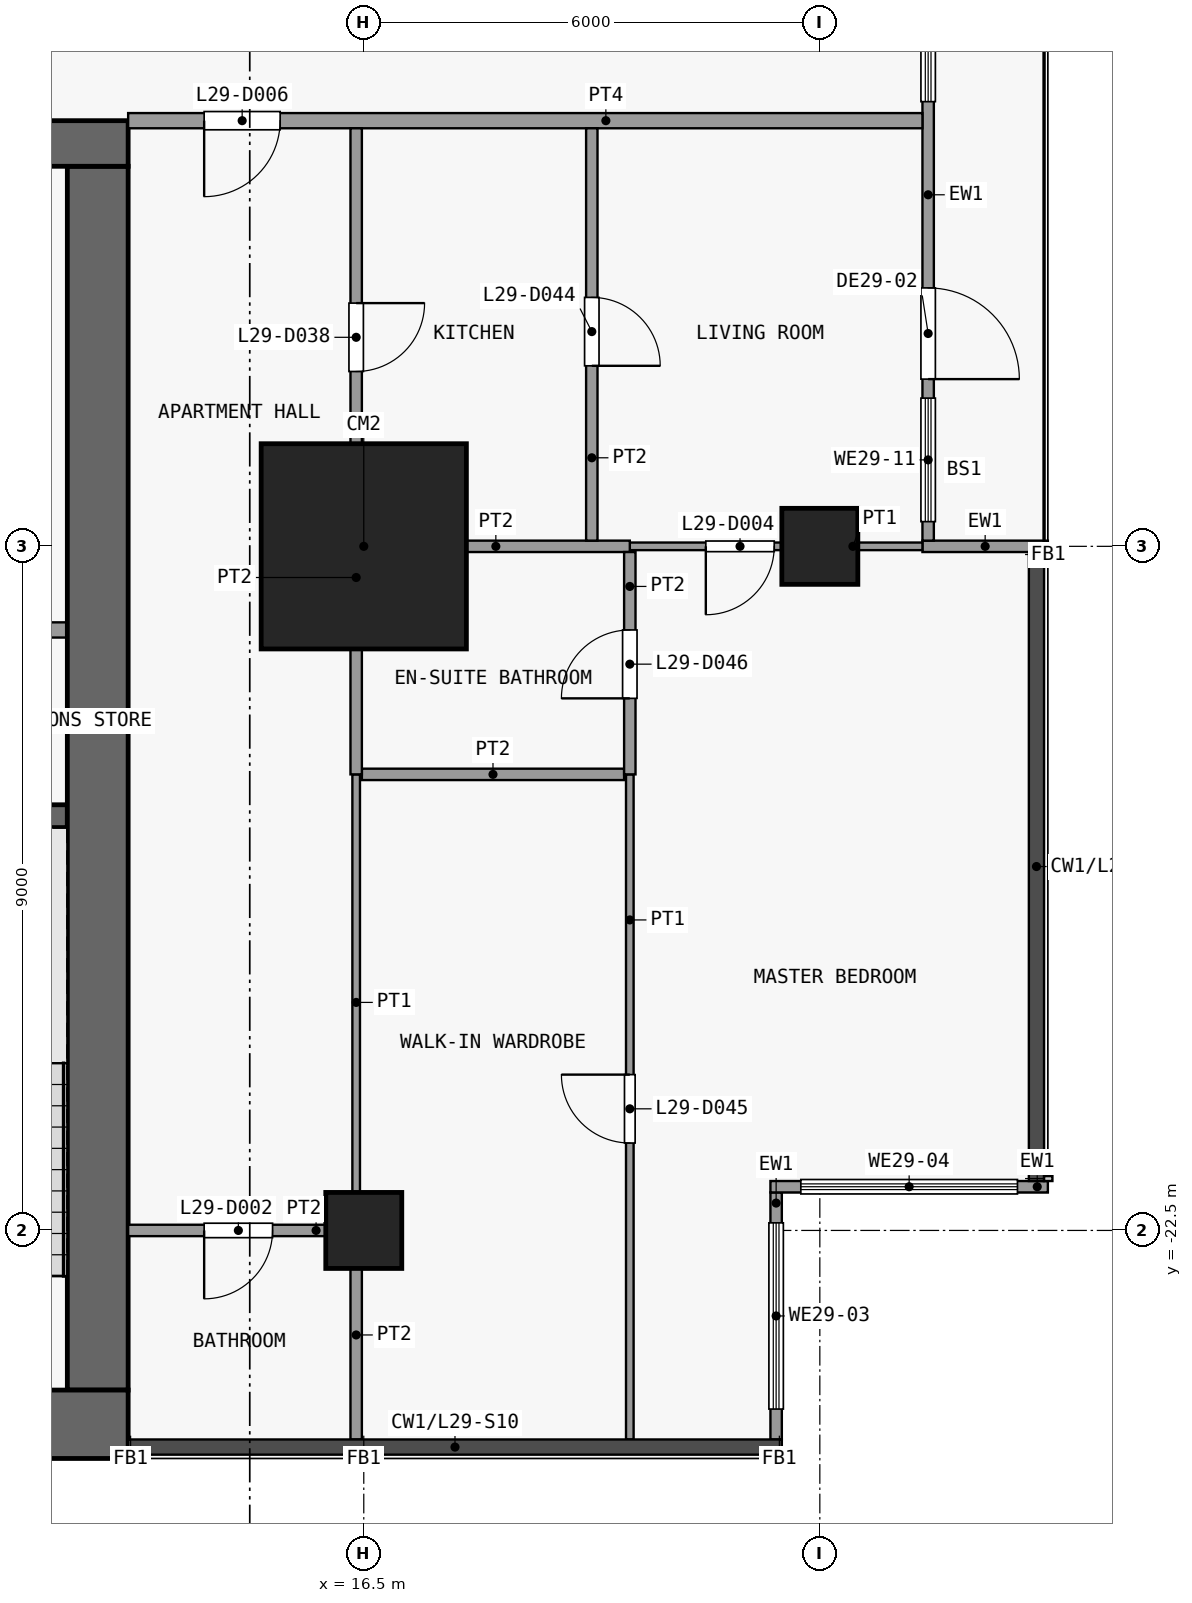
"""IFC4 building model, lengths in metres.
Left out: names, types, materials, properties, quantities, classifications, styles, units other than length and angle.
Written with IfcOpenShell. Run it as: python <this file> out.ifc"""

import sys

from ifc_helpers import new_model, si_unit, direction, frame, frame_2d, origin, origin_2d, place, context, subcontext, project, spatial, rectangle, extrude, element, fill, save


model = new_model("IFC4")
c1 = context("Model", 3, precision=1e-05, world=origin(), true_north=direction((0.0, 1.0)))
c2 = subcontext(c1, "Body", "Model", "MODEL_VIEW")
j1 = project(units=[si_unit("LENGTHUNIT", "METRE"), si_unit("PLANEANGLEUNIT", "RADIAN")], contexts=[c1])
p1 = place(None, origin())
s1 = spatial("IfcSite", under=j1, at=p1, CompositionType="ELEMENT")
p2 = place(p1, origin())
s2 = spatial("IfcBuilding", under=s1, at=p2, CompositionType="ELEMENT")
p3 = place(p2, frame((0.0, 0.0, 117.1)))
s3 = spatial("IfcBuildingStorey", under=s2, at=p3, CompositionType="ELEMENT", Elevation=117.1)
p4 = place(p3, frame((16.5, -22.5, 0.0), z_axis=(0.0, 0.0, 1.0), x_axis=(1.0, 0.0, 0.0)))
e1 = element("IfcColumn", 1, at=p4, inside=s3, PredefinedType="COLUMN", context=c2, shape_type="SweptSolid", body=[
    extrude(rectangle(XDim=1.0, YDim=1.0, at=origin_2d()), origin(), (0.0, 0.0, 1.0), 3.6),
])
p5 = place(p3, frame((16.5, -13.5, 0.0), z_axis=(0.0, 0.0, 1.0), x_axis=(1.0, 0.0, 0.0)))
e2 = element("IfcColumn", 2, at=p5, inside=s3, PredefinedType="COLUMN", context=c2, shape_type="SweptSolid", body=[
    extrude(rectangle(XDim=2.7, YDim=2.7, at=origin_2d()), origin(), (0.0, 0.0, 1.0), 3.6),
])
p6 = place(p3, frame((22.5, -13.5, 0.0), z_axis=(0.0, 0.0, 1.0), x_axis=(1.0, 0.0, 0.0)))
e3 = element("IfcColumn", 3, at=p6, inside=s3, PredefinedType="COLUMN", context=c2, shape_type="SweptSolid", body=[
    extrude(rectangle(XDim=1.0, YDim=1.0, at=origin_2d()), origin(), (0.0, 0.0, 1.0), 3.6),
])
p7 = place(p3, frame((-13.4, -25.05, 0.0), z_axis=(0.0, 0.0, 1.0), x_axis=(1.0, 0.0, 0.0)))
e4 = element("IfcWall", 4, at=p7, inside=s3, PredefinedType="SHEAR", context=c2, shape_type="SweptSolid", body=[
    extrude(rectangle(XDim=26.8, YDim=0.9, at=frame_2d((13.4, 0.0))), origin(), (0.0, 0.0, 1.0), 3.3),
])
p8 = place(p3, frame((-13.4, -8.2, 0.0), z_axis=(0.0, 0.0, 1.0), x_axis=(1.0, 0.0, 0.0)))
e5 = element("IfcWall", 5, at=p8, inside=s3, PredefinedType="SHEAR", context=c2, shape_type="SweptSolid", body=[
    extrude(rectangle(XDim=26.8, YDim=0.6, at=frame_2d((13.4, 0.0))), origin(), (0.0, 0.0, 1.0), 3.3),
])
p9 = place(p8, frame((7.7, 0.0, 0.0)))
e6 = element("IfcOpeningElement", 6, at=p9, cuts=e5, PredefinedType="OPENING", context=c2, shape_type="SweptSolid", body=[
    extrude(rectangle(XDim=1.8, YDim=2.1, at=frame_2d((0.9, 1.05))), frame((0.0, 0.31, 0.0), z_axis=(0.0, -1.0, 0.0), x_axis=(1.0, 0.0, 0.0)), (0.0, 0.0, 1.0), 0.62),
])
p10 = place(p8, frame((17.3, 0.0, 0.0)))
e7 = element("IfcOpeningElement", 7, at=p10, cuts=e5, PredefinedType="OPENING", context=c2, shape_type="SweptSolid", body=[
    extrude(rectangle(XDim=1.8, YDim=2.1, at=frame_2d((0.9, 1.05))), frame((0.0, 0.31, 0.0), z_axis=(0.0, -1.0, 0.0), x_axis=(1.0, 0.0, 0.0)), (0.0, 0.0, 1.0), 0.62),
])
p11 = place(p8, frame((1.625, 0.0, 0.0)))
e8 = element("IfcOpeningElement", 8, at=p11, cuts=e5, PredefinedType="OPENING", context=c2, shape_type="SweptSolid", body=[
    extrude(rectangle(XDim=1.2, YDim=2.1, at=frame_2d((0.6, 1.05))), frame((0.0, 0.31, 0.0), z_axis=(0.0, -1.0, 0.0), x_axis=(1.0, 0.0, 0.0)), (0.0, 0.0, 1.0), 0.62),
])
p12 = place(p8, frame((23.275, 0.0, 0.0)))
e9 = element("IfcOpeningElement", 9, at=p12, cuts=e5, PredefinedType="OPENING", context=c2, shape_type="SweptSolid", body=[
    extrude(rectangle(XDim=0.9, YDim=2.1, at=frame_2d((0.45, 1.05))), frame((0.0, 0.31, 0.0), z_axis=(0.0, -1.0, 0.0), x_axis=(1.0, 0.0, 0.0)), (0.0, 0.0, 1.0), 0.62),
])
p13 = place(p3, frame((13.0, -24.6, 0.0), z_axis=(0.0, 0.0, 1.0), x_axis=(0.0, 1.0, 0.0)))
e10 = element("IfcWall", 10, at=p13, inside=s3, PredefinedType="SHEAR", context=c2, shape_type="SweptSolid", body=[
    extrude(rectangle(XDim=16.1, YDim=0.8, at=frame_2d((8.05, 0.0))), origin(), (0.0, 0.0, 1.0), 3.3),
])
p14 = place(p3, frame((9.5, -17.05, 0.0), z_axis=(0.0, 0.0, 1.0), x_axis=(1.0, 0.0, 0.0)))
e11 = element("IfcWall", 11, at=p14, inside=s3, PredefinedType="SHEAR", context=c2, shape_type="SweptSolid", body=[
    extrude(rectangle(XDim=3.1, YDim=0.3, at=frame_2d((1.55, 0.0))), origin(), (0.0, 0.0, 1.0), 3.3),
])
p15 = place(p3, frame((11.15, -14.6, 0.0), z_axis=(0.0, 0.0, 1.0), x_axis=(1.0, 0.0, 0.0)))
e12 = element("IfcWall", 12, at=p15, inside=s3, PredefinedType="PARTITIONING", context=c2, shape_type="SweptSolid", body=[
    extrude(rectangle(XDim=1.45, YDim=0.2, at=frame_2d((0.725, 0.0))), origin(), (0.0, 0.0, 1.0), 3.3),
])
p16 = place(p3, frame((21.925, -22.0, 0.0), z_axis=(0.0, 0.0, 1.0), x_axis=(0.0, -1.0, 0.0)))
e13 = element("IfcWall", 13, at=p16, inside=s3, PredefinedType="SOLIDWALL", context=c2, shape_type="SweptSolid", body=[
    extrude(rectangle(XDim=3.25, YDim=0.15, at=frame_2d((1.625, 0.0))), origin(), (0.0, 0.0, 1.0), 3.3),
])
p17 = place(p16, frame((0.4, 0.0, 0.9)))
e14 = element("IfcOpeningElement", 14, at=p17, cuts=e13, PredefinedType="OPENING", context=c2, shape_type="SweptSolid", body=[
    extrude(rectangle(XDim=2.45, YDim=2.4, at=frame_2d((1.225, 1.2))), frame((0.0, 0.085, 0.0), z_axis=(0.0, -1.0, 0.0), x_axis=(1.0, 0.0, 0.0)), (0.0, 0.0, 1.0), 0.17),
])
p18 = place(p3, frame((25.5, -21.925, 0.0), z_axis=(0.0, 0.0, 1.0), x_axis=(-1.0, 0.0, 0.0)))
e15 = element("IfcWall", 15, at=p18, inside=s3, PredefinedType="SOLIDWALL", context=c2, shape_type="SweptSolid", body=[
    extrude(rectangle(XDim=3.65, YDim=0.15, at=frame_2d((1.825, 0.0))), origin(), (0.0, 0.0, 1.0), 3.3),
])
p19 = place(p18, frame((0.4, 0.0, 0.9)))
e16 = element("IfcOpeningElement", 16, at=p19, cuts=e15, PredefinedType="OPENING", context=c2, shape_type="SweptSolid", body=[
    extrude(rectangle(XDim=2.85, YDim=2.4, at=frame_2d((1.425, 1.2))), frame((0.0, 0.085, 0.0), z_axis=(0.0, -1.0, 0.0), x_axis=(1.0, 0.0, 0.0)), (0.0, 0.0, 1.0), 0.17),
])
p20 = place(p3, frame((23.85, -13.5, 0.0), z_axis=(0.0, 0.0, 1.0), x_axis=(1.0, 0.0, 0.0)))
e17 = element("IfcWall", 17, at=p20, inside=s3, PredefinedType="SOLIDWALL", context=c2, shape_type="SweptSolid", body=[
    extrude(rectangle(XDim=1.65, YDim=0.15, at=frame_2d((0.825, 0.0))), origin(), (0.0, 0.0, 1.0), 3.3),
])
p21 = place(p3, frame((23.925, -4.575, 0.0), z_axis=(0.0, 0.0, 1.0), x_axis=(0.0, -1.0, 0.0)))
e18 = element("IfcWall", 18, at=p21, inside=s3, PredefinedType="SOLIDWALL", context=c2, shape_type="SweptSolid", body=[
    extrude(rectangle(XDim=8.85, YDim=0.15, at=frame_2d((4.425, 0.0))), origin(), (0.0, 0.0, 1.0), 3.3),
])
p22 = place(p21, frame((5.525, 0.0, 0.0)))
e19 = element("IfcOpeningElement", 19, at=p22, cuts=e18, PredefinedType="OPENING", context=c2, shape_type="SweptSolid", body=[
    extrude(rectangle(XDim=1.2, YDim=2.4, at=frame_2d((0.6, 1.2))), frame((0.0, 0.085, 0.0), z_axis=(0.0, -1.0, 0.0), x_axis=(1.0, 0.0, 0.0)), (0.0, 0.0, 1.0), 0.17),
])
p23 = place(p21, frame((6.975, 0.0, 0.9)))
e20 = element("IfcOpeningElement", 20, at=p23, cuts=e18, PredefinedType="OPENING", context=c2, shape_type="SweptSolid", body=[
    extrude(rectangle(XDim=1.625, YDim=2.1, at=frame_2d((0.812, 1.05))), frame((0.0, 0.085, 0.0), z_axis=(0.0, -1.0, 0.0), x_axis=(1.0, 0.0, 0.0)), (0.0, 0.0, 1.0), 0.17),
])
p24 = place(p21, frame((1.263, 0.0, 0.9)))
e21 = element("IfcOpeningElement", 21, at=p24, cuts=e18, PredefinedType="OPENING", context=c2, shape_type="SweptSolid", body=[
    extrude(rectangle(XDim=1.812, YDim=2.1, at=frame_2d((0.906, 1.05))), frame((0.0, 0.085, 0.0), z_axis=(0.0, -1.0, 0.0), x_axis=(1.0, 0.0, 0.0)), (0.0, 0.0, 1.0), 0.17),
])
p25 = place(p3, frame((13.4, -22.5, 0.0), z_axis=(0.0, 0.0, 1.0), x_axis=(1.0, 0.0, 0.0)))
e22 = element("IfcWall", 22, at=p25, inside=s3, PredefinedType="PARTITIONING", context=c2, shape_type="SweptSolid", body=[
    extrude(rectangle(XDim=2.925, YDim=0.15, at=frame_2d((1.462, 0.0))), origin(), (0.0, 0.0, 1.0), 3.3),
])
p26 = place(p25, frame((1.0, 0.0, 0.0)))
e23 = element("IfcOpeningElement", 23, at=p26, cuts=e22, PredefinedType="OPENING", context=c2, shape_type="SweptSolid", body=[
    extrude(rectangle(XDim=0.9, YDim=2.1, at=frame_2d((0.45, 1.05))), frame((0.0, 0.085, 0.0), z_axis=(0.0, -1.0, 0.0), x_axis=(1.0, 0.0, 0.0)), (0.0, 0.0, 1.0), 0.17),
])
p27 = place(p3, frame((16.475, -16.5, 0.0), z_axis=(0.0, 0.0, 1.0), x_axis=(1.0, 0.0, 0.0)))
e24 = element("IfcWall", 24, at=p27, inside=s3, PredefinedType="PARTITIONING", context=c2, shape_type="SweptSolid", body=[
    extrude(rectangle(XDim=3.45, YDim=0.15, at=frame_2d((1.725, 0.0))), origin(), (0.0, 0.0, 1.0), 3.3),
])
p28 = place(p3, frame((20.0, -13.5, 0.0), z_axis=(0.0, 0.0, 1.0), x_axis=(1.0, 0.0, 0.0)))
e25 = element("IfcWall", 25, at=p28, inside=s3, PredefinedType="PARTITIONING", context=c2, shape_type="SweptSolid", body=[
    extrude(rectangle(XDim=3.85, YDim=0.1, at=frame_2d((1.925, 0.0))), origin(), (0.0, 0.0, 1.0), 3.3),
])
p29 = place(p28, frame((1.0, 0.0, 0.0)))
e26 = element("IfcOpeningElement", 26, at=p29, cuts=e25, PredefinedType="OPENING", context=c2, shape_type="SweptSolid", body=[
    extrude(rectangle(XDim=0.9, YDim=2.1, at=frame_2d((0.45, 1.05))), frame((0.0, 0.06, 0.0), z_axis=(0.0, -1.0, 0.0), x_axis=(1.0, 0.0, 0.0)), (0.0, 0.0, 1.0), 0.12),
])
p30 = place(p3, frame((16.475, -13.5, 0.0), z_axis=(0.0, 0.0, 1.0), x_axis=(1.0, 0.0, 0.0)))
e27 = element("IfcWall", 27, at=p30, inside=s3, PredefinedType="PARTITIONING", context=c2, shape_type="SweptSolid", body=[
    extrude(rectangle(XDim=3.525, YDim=0.15, at=frame_2d((1.762, 0.0))), origin(), (0.0, 0.0, 1.0), 3.3),
])
p31 = place(p3, frame((13.4, -7.9, 0.0), z_axis=(0.0, 0.0, 1.0), x_axis=(1.0, 0.0, 0.0)))
e28 = element("IfcWall", 28, at=p31, inside=s3, PredefinedType="PARTITIONING", context=c2, shape_type="SweptSolid", body=[
    extrude(rectangle(XDim=10.45, YDim=0.2, at=frame_2d((5.225, 0.0))), origin(), (0.0, 0.0, 1.0), 3.3),
])
p32 = place(p31, frame((1.0, 0.0, 0.0)))
e29 = element("IfcOpeningElement", 29, at=p32, cuts=e28, PredefinedType="OPENING", context=c2, shape_type="SweptSolid", body=[
    extrude(rectangle(XDim=1.0, YDim=2.1, at=frame_2d((0.5, 1.05))), frame((0.0, 0.11, 0.0), z_axis=(0.0, -1.0, 0.0), x_axis=(1.0, 0.0, 0.0)), (0.0, 0.0, 1.0), 0.22),
])
p33 = place(p3, frame((16.4, -22.5, 0.0), z_axis=(0.0, 0.0, 1.0), x_axis=(0.0, 1.0, 0.0)))
e30 = element("IfcWall", 30, at=p33, inside=s3, PredefinedType="PARTITIONING", context=c2, shape_type="SweptSolid", body=[
    extrude(rectangle(XDim=6.0, YDim=0.1, at=frame_2d((3.0, 0.0))), origin(), (0.0, 0.0, 1.0), 3.3),
])
p34 = place(p3, frame((16.4, -25.25, 0.0), z_axis=(0.0, 0.0, 1.0), x_axis=(0.0, 1.0, 0.0)))
e31 = element("IfcWall", 31, at=p34, inside=s3, PredefinedType="PARTITIONING", context=c2, shape_type="SweptSolid", body=[
    extrude(rectangle(XDim=2.75, YDim=0.15, at=frame_2d((1.375, 0.0))), origin(), (0.0, 0.0, 1.0), 3.3),
])
p35 = place(p3, frame((16.4, -16.5, 0.0), z_axis=(0.0, 0.0, 1.0), x_axis=(0.0, 1.0, 0.0)))
e32 = element("IfcWall", 32, at=p35, inside=s3, PredefinedType="PARTITIONING", context=c2, shape_type="SweptSolid", body=[
    extrude(rectangle(XDim=8.5, YDim=0.15, at=frame_2d((4.25, 0.0))), origin(), (0.0, 0.0, 1.0), 3.3),
])
p36 = place(p35, frame((5.3, 0.0, 0.0)))
e33 = element("IfcOpeningElement", 33, at=p36, cuts=e32, PredefinedType="OPENING", context=c2, shape_type="SweptSolid", body=[
    extrude(rectangle(XDim=0.9, YDim=2.1, at=frame_2d((0.45, 1.05))), frame((0.0, 0.085, 0.0), z_axis=(0.0, -1.0, 0.0), x_axis=(1.0, 0.0, 0.0)), (0.0, 0.0, 1.0), 0.17),
])
p37 = place(p3, frame((19.5, -13.425, 0.0), z_axis=(0.0, 0.0, 1.0), x_axis=(0.0, 1.0, 0.0)))
e34 = element("IfcWall", 34, at=p37, inside=s3, PredefinedType="PARTITIONING", context=c2, shape_type="SweptSolid", body=[
    extrude(rectangle(XDim=5.425, YDim=0.15, at=frame_2d((2.712, 0.0))), origin(), (0.0, 0.0, 1.0), 3.3),
])
p38 = place(p37, frame((2.3, 0.0, 0.0)))
e35 = element("IfcOpeningElement", 35, at=p38, cuts=e34, PredefinedType="OPENING", context=c2, shape_type="SweptSolid", body=[
    extrude(rectangle(XDim=0.9, YDim=2.1, at=frame_2d((0.45, 1.05))), frame((0.0, 0.085, 0.0), z_axis=(0.0, -1.0, 0.0), x_axis=(1.0, 0.0, 0.0)), (0.0, 0.0, 1.0), 0.17),
])
p39 = place(p3, frame((20.0, -25.25, 0.0), z_axis=(0.0, 0.0, 1.0), x_axis=(0.0, 1.0, 0.0)))
e36 = element("IfcWall", 36, at=p39, inside=s3, PredefinedType="PARTITIONING", context=c2, shape_type="SweptSolid", body=[
    extrude(rectangle(XDim=8.75, YDim=0.1, at=frame_2d((4.375, 0.0))), origin(), (0.0, 0.0, 1.0), 3.3),
])
p40 = place(p39, frame((3.9, 0.0, 0.0)))
e37 = element("IfcOpeningElement", 37, at=p40, cuts=e36, PredefinedType="OPENING", context=c2, shape_type="SweptSolid", body=[
    extrude(rectangle(XDim=0.9, YDim=2.1, at=frame_2d((0.45, 1.05))), frame((0.0, 0.06, 0.0), z_axis=(0.0, -1.0, 0.0), x_axis=(1.0, 0.0, 0.0)), (0.0, 0.0, 1.0), 0.12),
])
p41 = place(p3, frame((20.0, -16.5, 0.0), z_axis=(0.0, 0.0, 1.0), x_axis=(0.0, 1.0, 0.0)))
e38 = element("IfcWall", 38, at=p41, inside=s3, PredefinedType="PARTITIONING", context=c2, shape_type="SweptSolid", body=[
    extrude(rectangle(XDim=2.925, YDim=0.15, at=frame_2d((1.462, 0.0))), origin(), (0.0, 0.0, 1.0), 3.3),
])
p42 = place(p41, frame((1.0, 0.0, 0.0)))
e39 = element("IfcOpeningElement", 39, at=p42, cuts=e38, PredefinedType="OPENING", context=c2, shape_type="SweptSolid", body=[
    extrude(rectangle(XDim=0.9, YDim=2.1, at=frame_2d((0.45, 1.05))), frame((0.0, 0.085, 0.0), z_axis=(0.0, -1.0, 0.0), x_axis=(1.0, 0.0, 0.0)), (0.0, 0.0, 1.0), 0.17),
])
p43 = place(p17, origin())
e40 = element("IfcWindow", 40, at=p43, inside=s3, PartitioningType="SINGLE_PANEL", PredefinedType="WINDOW", context=c2, shape_type="SweptSolid", body=[
    extrude(rectangle(XDim=2.45, YDim=2.4, at=frame_2d((1.225, 1.2))), frame((0.0, 0.03, 0.0), z_axis=(0.0, -1.0, 0.0), x_axis=(1.0, 0.0, 0.0)), (0.0, 0.0, 1.0), 0.06),
])
fill(e14, e40)
p44 = place(p19, origin())
e41 = element("IfcWindow", 41, at=p44, inside=s3, PartitioningType="SINGLE_PANEL", PredefinedType="WINDOW", context=c2, shape_type="SweptSolid", body=[
    extrude(rectangle(XDim=2.85, YDim=2.4, at=frame_2d((1.425, 1.2))), frame((0.0, 0.03, 0.0), z_axis=(0.0, -1.0, 0.0), x_axis=(1.0, 0.0, 0.0)), (0.0, 0.0, 1.0), 0.06),
])
fill(e16, e41)
p45 = place(p22, origin())
e42 = element("IfcDoor", 42, at=p45, inside=s3, OperationType="SINGLE_SWING_RIGHT", PredefinedType="DOOR", context=c2, shape_type="SweptSolid", body=[
    extrude(rectangle(XDim=1.2, YDim=2.4, at=frame_2d((0.6, 1.2))), frame((0.0, 0.025, 0.0), z_axis=(0.0, -1.0, 0.0), x_axis=(1.0, 0.0, 0.0)), (0.0, 0.0, 1.0), 0.05),
])
fill(e19, e42)
p46 = place(p23, origin())
e43 = element("IfcWindow", 43, at=p46, inside=s3, PartitioningType="SINGLE_PANEL", PredefinedType="WINDOW", context=c2, shape_type="SweptSolid", body=[
    extrude(rectangle(XDim=1.625, YDim=2.1, at=frame_2d((0.812, 1.05))), frame((0.0, 0.03, 0.0), z_axis=(0.0, -1.0, 0.0), x_axis=(1.0, 0.0, 0.0)), (0.0, 0.0, 1.0), 0.06),
])
fill(e20, e43)
p47 = place(p24, origin())
e44 = element("IfcWindow", 44, at=p47, inside=s3, PartitioningType="SINGLE_PANEL", PredefinedType="WINDOW", context=c2, shape_type="SweptSolid", body=[
    extrude(rectangle(XDim=1.812, YDim=2.1, at=frame_2d((0.906, 1.05))), frame((0.0, 0.03, 0.0), z_axis=(0.0, -1.0, 0.0), x_axis=(1.0, 0.0, 0.0)), (0.0, 0.0, 1.0), 0.06),
])
fill(e21, e44)
p48 = place(p26, origin())
e45 = element("IfcDoor", 45, at=p48, inside=s3, OperationType="SINGLE_SWING_LEFT", PredefinedType="DOOR", context=c2, shape_type="SweptSolid", body=[
    extrude(rectangle(XDim=0.9, YDim=2.1, at=frame_2d((0.45, 1.05))), frame((0.0, 0.025, 0.0), z_axis=(0.0, -1.0, 0.0), x_axis=(1.0, 0.0, 0.0)), (0.0, 0.0, 1.0), 0.05),
])
fill(e23, e45)
p49 = place(p29, origin())
e46 = element("IfcDoor", 46, at=p49, inside=s3, OperationType="SINGLE_SWING_LEFT", PredefinedType="DOOR", context=c2, shape_type="SweptSolid", body=[
    extrude(rectangle(XDim=0.9, YDim=2.1, at=frame_2d((0.45, 1.05))), frame((0.0, 0.025, 0.0), z_axis=(0.0, -1.0, 0.0), x_axis=(1.0, 0.0, 0.0)), (0.0, 0.0, 1.0), 0.05),
])
fill(e26, e46)
p50 = place(p32, origin())
e47 = element("IfcDoor", 47, at=p50, inside=s3, OperationType="SINGLE_SWING_LEFT", PredefinedType="DOOR", context=c2, shape_type="SweptSolid", body=[
    extrude(rectangle(XDim=1.0, YDim=2.1, at=frame_2d((0.5, 1.05))), frame((0.0, 0.025, 0.0), z_axis=(0.0, -1.0, 0.0), x_axis=(1.0, 0.0, 0.0)), (0.0, 0.0, 1.0), 0.05),
])
fill(e29, e47)
p51 = place(p36, origin())
e48 = element("IfcDoor", 48, at=p51, inside=s3, OperationType="SINGLE_SWING_RIGHT", PredefinedType="DOOR", context=c2, shape_type="SweptSolid", body=[
    extrude(rectangle(XDim=0.9, YDim=2.1, at=frame_2d((0.45, 1.05))), frame((0.0, 0.025, 0.0), z_axis=(0.0, -1.0, 0.0), x_axis=(1.0, 0.0, 0.0)), (0.0, 0.0, 1.0), 0.05),
])
fill(e33, e48)
p52 = place(p38, origin())
e49 = element("IfcDoor", 49, at=p52, inside=s3, OperationType="SINGLE_SWING_LEFT", PredefinedType="DOOR", context=c2, shape_type="SweptSolid", body=[
    extrude(rectangle(XDim=0.9, YDim=2.1, at=frame_2d((0.45, 1.05))), frame((0.0, 0.025, 0.0), z_axis=(0.0, -1.0, 0.0), x_axis=(1.0, 0.0, 0.0)), (0.0, 0.0, 1.0), 0.05),
])
fill(e35, e49)
p53 = place(p40, origin())
e50 = element("IfcDoor", 50, at=p53, inside=s3, OperationType="SINGLE_SWING_LEFT", PredefinedType="DOOR", context=c2, shape_type="SweptSolid", body=[
    extrude(rectangle(XDim=0.9, YDim=2.1, at=frame_2d((0.45, 1.05))), frame((0.0, 0.025, 0.0), z_axis=(0.0, -1.0, 0.0), x_axis=(1.0, 0.0, 0.0)), (0.0, 0.0, 1.0), 0.05),
])
fill(e37, e50)
p54 = place(p42, origin())
e51 = element("IfcDoor", 51, at=p54, inside=s3, OperationType="SINGLE_SWING_RIGHT", PredefinedType="DOOR", context=c2, shape_type="SweptSolid", body=[
    extrude(rectangle(XDim=0.9, YDim=2.1, at=frame_2d((0.45, 1.05))), frame((0.0, 0.025, 0.0), z_axis=(0.0, -1.0, 0.0), x_axis=(1.0, 0.0, 0.0)), (0.0, 0.0, 1.0), 0.05),
])
fill(e39, e51)
save(model, sys.argv[1])
